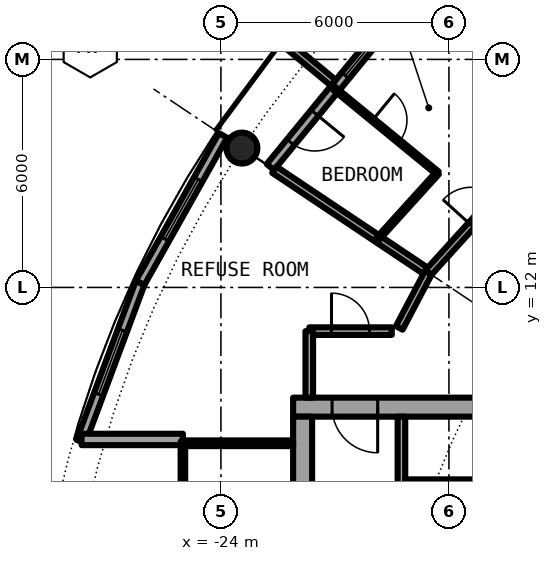
"""IFC4 building model, lengths in metres.
Left out: names, types, materials, properties, quantities, classifications, styles, units other than length and angle.
Written with IfcOpenShell. Run it as: python <this file> out.ifc"""

import sys

from ifc_helpers import new_model, si_unit, direction, frame, frame_2d, origin, origin_2d, place, context, subcontext, project, spatial, rectangle, hollow_circle, extrude, element, fill, save


model = new_model("IFC4")
c1 = context("Model", 3, precision=1e-05, world=origin(), true_north=direction((0.0, 1.0)))
c2 = subcontext(c1, "Body", "Model", "MODEL_VIEW")
j1 = project(units=[si_unit("LENGTHUNIT", "METRE"), si_unit("PLANEANGLEUNIT", "RADIAN")], contexts=[c1])
p1 = place(None, origin())
s1 = spatial("IfcSite", under=j1, at=p1, CompositionType="ELEMENT")
p2 = place(p1, origin())
s2 = spatial("IfcBuilding", under=s1, at=p2, CompositionType="ELEMENT")
p3 = place(p2, frame((0.0, 0.0, 145.2)))
s3 = spatial("IfcBuildingStorey", under=s2, at=p3, CompositionType="ELEMENT", Elevation=145.2)
p4 = place(p3, frame((-23.448, 15.667, 0.0), z_axis=(0.0, 0.0, 1.0), x_axis=(1.0, 0.0, 0.0)))
e1 = element("IfcColumn", 1, at=p4, inside=s3, PredefinedType="COLUMN", context=c2, shape_type="SweptSolid", body=[
    extrude(hollow_circle(Radius=0.406, WallThickness=0.04, at=origin_2d()), origin(), (0.0, 0.0, 1.0), 3.05),
])
p5 = place(p3, frame((-19.304, 19.304, 0.0), z_axis=(0.0, 0.0, 1.0), x_axis=(-0.634382322723, -0.773019449054, 0.0)))
e2 = element("IfcWall", 2, at=p5, inside=s3, PredefinedType="SOLIDWALL", context=c2, shape_type="SweptSolid", body=[
    extrude(rectangle(XDim=5.352, YDim=0.25, at=frame_2d((2.676, 0.0))), origin(), (0.0, 0.0, 1.0), 2.7),
])
p6 = place(p5, frame((0.441, 0.0, 0.3)))
e3 = element("IfcOpeningElement", 3, at=p6, cuts=e2, PredefinedType="OPENING", context=c2, shape_type="SweptSolid", body=[
    extrude(rectangle(XDim=1.8, YDim=2.1, at=frame_2d((0.9, 1.05))), frame((0.0, 0.135, 0.0), z_axis=(0.0, -1.0, 0.0), x_axis=(1.0, 0.0, 0.0)), (0.0, 0.0, 1.0), 0.27),
])
p7 = place(p5, frame((3.51, 0.0, 0.0)))
e4 = element("IfcOpeningElement", 4, at=p7, cuts=e2, PredefinedType="OPENING", context=c2, shape_type="SweptSolid", body=[
    extrude(rectangle(XDim=1.0, YDim=2.2, at=frame_2d((0.5, 1.1))), frame((0.0, 0.135, 0.0), z_axis=(0.0, -1.0, 0.0), x_axis=(1.0, 0.0, 0.0)), (0.0, 0.0, 1.0), 0.27),
])
p8 = place(p3, frame((-21.041, 17.384, -0.03), z_axis=(0.0, 0.0, 1.0), x_axis=(-0.770784861449, 0.63709551667, 0.0)))
e5 = element("IfcWall", 5, at=p8, inside=s3, PredefinedType="SOLIDWALL", context=c2, shape_type="SweptSolid", body=[
    extrude(rectangle(XDim=3.006, YDim=0.2, at=frame_2d((1.503, 0.0))), origin(), (0.0, 0.0, 1.0), 2.73),
])
p9 = place(p3, frame((-23.946, 16.0, 0.0), z_axis=(0.0, 0.0, 1.0), x_axis=(-0.489696356642, -0.871893042919, 0.0)))
e6 = element("IfcWall", 6, at=p9, inside=s3, PredefinedType="SOLIDWALL", context=c2, shape_type="SweptSolid", body=[
    extrude(rectangle(XDim=4.454, YDim=0.25, at=frame_2d((2.227, 0.0))), origin(), (0.0, 0.0, 1.0), 2.7),
])
p10 = place(p9, frame((1.327, 0.0, 0.3)))
e7 = element("IfcOpeningElement", 7, at=p10, cuts=e6, PredefinedType="OPENING", context=c2, shape_type="SweptSolid", body=[
    extrude(rectangle(XDim=1.8, YDim=2.1, at=frame_2d((0.9, 1.05))), frame((0.0, 0.135, 0.0), z_axis=(0.0, -1.0, 0.0), x_axis=(1.0, 0.0, 0.0)), (0.0, 0.0, 1.0), 0.27),
])
p11 = place(p3, frame((-26.127, 12.117, 0.0), z_axis=(0.0, 0.0, 1.0), x_axis=(-0.349247811493, -0.937030397675, 0.0)))
e8 = element("IfcWall", 8, at=p11, inside=s3, PredefinedType="SOLIDWALL", context=c2, shape_type="SweptSolid", body=[
    extrude(rectangle(XDim=4.452, YDim=0.25, at=frame_2d((2.226, 0.0))), origin(), (0.0, 0.0, 1.0), 2.7),
])
p12 = place(p11, frame((1.327, 0.0, 0.3)))
e9 = element("IfcOpeningElement", 9, at=p12, cuts=e8, PredefinedType="OPENING", context=c2, shape_type="SweptSolid", body=[
    extrude(rectangle(XDim=1.8, YDim=2.1, at=frame_2d((0.9, 1.05))), frame((0.0, 0.135, 0.0), z_axis=(0.0, -1.0, 0.0), x_axis=(1.0, 0.0, 0.0)), (0.0, 0.0, 1.0), 0.27),
])
p13 = place(p3, frame((-25.0, 8.0, 0.0), z_axis=(0.0, 0.0, 1.0), x_axis=(-1.0, 0.0, 0.0)))
e10 = element("IfcWall", 10, at=p13, inside=s3, PredefinedType="SOLIDWALL", context=c2, shape_type="SweptSolid", body=[
    extrude(rectangle(XDim=2.667, YDim=0.3, at=frame_2d((1.333, 0.0))), origin(), (0.0, 0.0, 1.0), 2.7),
])
p14 = place(p3, frame((-8.5, 8.85, 0.0), z_axis=(0.0, 0.0, 1.0), x_axis=(-1.0, 0.0, 0.0)))
e11 = element("IfcWall", 11, at=p14, inside=s3, PredefinedType="SHEAR", context=c2, shape_type="SweptSolid", body=[
    extrude(rectangle(XDim=13.6, YDim=0.5, at=frame_2d((6.8, 0.0))), origin(), (0.0, 0.0, 1.0), 3.05),
])
p15 = place(p14, frame((11.375, 0.0, 0.0)))
e12 = element("IfcOpeningElement", 12, at=p15, cuts=e11, PredefinedType="OPENING", context=c2, shape_type="SweptSolid", body=[
    extrude(rectangle(XDim=1.2, YDim=2.3, at=frame_2d((0.6, 1.15))), frame((0.0, 0.26, 0.0), z_axis=(0.0, -1.0, 0.0), x_axis=(1.0, 0.0, 0.0)), (0.0, 0.0, 1.0), 0.52),
])
p16 = place(p3, frame((-21.85, -8.6, 0.0), z_axis=(0.0, 0.0, 1.0), x_axis=(0.0, 1.0, 0.0)))
e13 = element("IfcWall", 13, at=p16, inside=s3, PredefinedType="SHEAR", context=c2, shape_type="SweptSolid", body=[
    extrude(rectangle(XDim=17.2, YDim=0.5, at=frame_2d((8.6, 0.0))), origin(), (0.0, 0.0, 1.0), 3.05),
])
p17 = place(p16, frame((7.7, 0.0, 0.0)))
e14 = element("IfcOpeningElement", 14, at=p17, cuts=e13, PredefinedType="OPENING", context=c2, shape_type="SweptSolid", body=[
    extrude(rectangle(XDim=1.8, YDim=2.3, at=frame_2d((0.9, 1.15))), frame((0.0, 0.26, 0.0), z_axis=(0.0, -1.0, 0.0), x_axis=(1.0, 0.0, 0.0)), (0.0, 0.0, 1.0), 0.52),
])
p18 = place(p3, frame((-19.25, 8.6, 0.0), z_axis=(0.0, 0.0, 1.0), x_axis=(0.0, -1.0, 0.0)))
e15 = element("IfcWall", 15, at=p18, inside=s3, PredefinedType="SOLIDWALL", context=c2, shape_type="SweptSolid", body=[
    extrude(rectangle(XDim=7.025, YDim=0.2, at=frame_2d((3.513, 0.0))), origin(), (0.0, 0.0, 1.0), 2.7),
])
p19 = place(p18, frame((2.35, 0.0, 0.0)))
e16 = element("IfcOpeningElement", 16, at=p19, cuts=e15, PredefinedType="OPENING", context=c2, shape_type="SweptSolid", body=[
    extrude(rectangle(XDim=1.1, YDim=2.3, at=frame_2d((0.55, 1.15))), frame((0.0, 0.11, 0.0), z_axis=(0.0, -1.0, 0.0), x_axis=(1.0, 0.0, 0.0)), (0.0, 0.0, 1.0), 0.22),
])
p20 = place(p3, frame((-15.45, 6.875, 0.0), z_axis=(0.0, 0.0, 1.0), x_axis=(-1.0, 0.0, 0.0)))
e17 = element("IfcWall", 17, at=p20, inside=s3, PredefinedType="PARTITIONING", context=c2, shape_type="SweptSolid", body=[
    extrude(rectangle(XDim=3.7, YDim=0.15, at=frame_2d((1.85, 0.0))), origin(), (0.0, 0.0, 1.0), 2.7),
])
p21 = place(p20, frame((1.4, 0.0, 0.0)))
e18 = element("IfcOpeningElement", 18, at=p21, cuts=e17, PredefinedType="OPENING", context=c2, shape_type="SweptSolid", body=[
    extrude(rectangle(XDim=0.9, YDim=2.3, at=frame_2d((0.45, 1.15))), frame((0.0, 0.085, 0.0), z_axis=(0.0, -1.0, 0.0), x_axis=(1.0, 0.0, 0.0)), (0.0, 0.0, 1.0), 0.17),
])
p22 = place(p3, frame((-22.1, 7.9, 0.0), z_axis=(0.0, 0.0, 1.0), x_axis=(-1.0, 0.0, 0.0)))
e19 = element("IfcWall", 19, at=p22, inside=s3, PredefinedType="PARTITIONING", context=c2, shape_type="SweptSolid", body=[
    extrude(rectangle(XDim=2.84, YDim=0.15, at=frame_2d((1.42, 0.0))), origin(), (0.0, 0.0, 1.0), 2.7),
])
p23 = place(p3, frame((-25.0, -7.95, 0.0), z_axis=(0.0, 0.0, 1.0), x_axis=(0.0, 1.0, 0.0)))
e20 = element("IfcWall", 20, at=p23, inside=s3, PredefinedType="PARTITIONING", context=c2, shape_type="SweptSolid", body=[
    extrude(rectangle(XDim=15.9, YDim=0.12, at=frame_2d((7.95, 0.0))), origin(), (0.0, 0.0, 1.0), 2.7),
])
p24 = place(p23, frame((6.75, 0.0, 0.0)))
e21 = element("IfcOpeningElement", 21, at=p24, cuts=e20, PredefinedType="OPENING", context=c2, shape_type="SweptSolid", body=[
    extrude(rectangle(XDim=2.4, YDim=2.3, at=frame_2d((1.2, 1.15))), frame((0.0, 0.07, 0.0), z_axis=(0.0, -1.0, 0.0), x_axis=(1.0, 0.0, 0.0)), (0.0, 0.0, 1.0), 0.14),
])
p25 = place(p23, frame((11.55, 0.0, 0.1)))
e22 = element("IfcOpeningElement", 22, at=p25, cuts=e20, PredefinedType="OPENING", context=c2, shape_type="SweptSolid", body=[
    extrude(rectangle(XDim=3.4, YDim=2.35, at=frame_2d((1.7, 1.175))), frame((0.0, 0.07, 0.0), z_axis=(0.0, -1.0, 0.0), x_axis=(1.0, 0.0, 0.0)), (0.0, 0.0, 1.0), 0.14),
])
p26 = place(p23, frame((0.95, 0.0, 0.1)))
e23 = element("IfcOpeningElement", 23, at=p26, cuts=e20, PredefinedType="OPENING", context=c2, shape_type="SweptSolid", body=[
    extrude(rectangle(XDim=3.4, YDim=2.35, at=frame_2d((1.7, 1.175))), frame((0.0, 0.07, 0.0), z_axis=(0.0, -1.0, 0.0), x_axis=(1.0, 0.0, 0.0)), (0.0, 0.0, 1.0), 0.14),
])
p27 = place(p3, frame((-22.595, 15.098, 0.0), z_axis=(0.0, 0.0, 1.0), x_axis=(0.831387096605, -0.55569370664, 0.0)))
e24 = element("IfcWall", 24, at=p27, inside=s3, PredefinedType="PARTITIONING", context=c2, shape_type="SweptSolid", body=[
    extrude(rectangle(XDim=4.875, YDim=0.2, at=frame_2d((2.438, 0.0))), origin(), (0.0, 0.0, 1.0), 2.7),
])
p28 = place(p3, frame((-21.012, 17.233, 0.0), z_axis=(0.0, 0.0, 1.0), x_axis=(0.773165322764, -0.634204528267, 0.0)))
e25 = element("IfcWall", 25, at=p28, inside=s3, PredefinedType="PARTITIONING", context=c2, shape_type="SweptSolid", body=[
    extrude(rectangle(XDim=3.505, YDim=0.1, at=frame_2d((1.752, 0.0))), origin(), (0.0, 0.0, 1.0), 2.7),
])
p29 = place(p28, frame((1.303, 0.0, 0.0)))
e26 = element("IfcOpeningElement", 26, at=p29, cuts=e25, PredefinedType="OPENING", context=c2, shape_type="SweptSolid", body=[
    extrude(rectangle(XDim=0.9, YDim=2.3, at=frame_2d((0.45, 1.15))), frame((0.0, 0.06, 0.0), z_axis=(0.0, -1.0, 0.0), x_axis=(1.0, 0.0, 0.0)), (0.0, 0.0, 1.0), 0.12),
])
p30 = place(p3, frame((-21.675, 10.85, 0.0), z_axis=(0.0, 0.0, 1.0), x_axis=(1.0, 0.0, 0.0)))
e27 = element("IfcWall", 27, at=p30, inside=s3, PredefinedType="PARTITIONING", context=c2, shape_type="SweptSolid", body=[
    extrude(rectangle(XDim=2.171, YDim=0.2, at=frame_2d((1.085, 0.0))), origin(), (0.0, 0.0, 1.0), 2.7),
])
p31 = place(p30, frame((0.585, 0.0, 0.0)))
e28 = element("IfcOpeningElement", 28, at=p31, cuts=e27, PredefinedType="OPENING", context=c2, shape_type="SweptSolid", body=[
    extrude(rectangle(XDim=1.0, YDim=2.3, at=frame_2d((0.5, 1.15))), frame((0.0, 0.11, 0.0), z_axis=(0.0, -1.0, 0.0), x_axis=(1.0, 0.0, 0.0)), (0.0, 0.0, 1.0), 0.22),
])
p32 = place(p3, frame((-21.675, 9.1, 0.0), z_axis=(0.0, 0.0, 1.0), x_axis=(0.0, 1.0, 0.0)))
e29 = element("IfcWall", 29, at=p32, inside=s3, PredefinedType="PARTITIONING", context=c2, shape_type="SweptSolid", body=[
    extrude(rectangle(XDim=1.75, YDim=0.2, at=frame_2d((0.875, 0.0))), origin(), (0.0, 0.0, 1.0), 2.7),
])
p33 = place(p3, frame((-18.542, 12.389, 0.0), z_axis=(0.0, 0.0, 1.0), x_axis=(0.671561669125, 0.740948665268, 0.0)))
e30 = element("IfcWall", 30, at=p33, inside=s3, PredefinedType="PARTITIONING", context=c2, shape_type="SweptSolid", body=[
    extrude(rectangle(XDim=6.544, YDim=0.2, at=frame_2d((3.272, 0.0))), origin(), (0.0, 0.0, 1.0), 2.7),
])
p34 = place(p33, frame((1.682, 0.0, 0.0)))
e31 = element("IfcOpeningElement", 31, at=p34, cuts=e30, PredefinedType="OPENING", context=c2, shape_type="SweptSolid", body=[
    extrude(rectangle(XDim=1.0, YDim=2.3, at=frame_2d((0.5, 1.15))), frame((0.0, 0.11, 0.0), z_axis=(0.0, -1.0, 0.0), x_axis=(1.0, 0.0, 0.0)), (0.0, 0.0, 1.0), 0.22),
])
p35 = place(p3, frame((-19.307, 10.935, 0.0), z_axis=(0.0, 0.0, 1.0), x_axis=(0.465605550524, 0.884992356646, 0.0)))
e32 = element("IfcWall", 32, at=p35, inside=s3, PredefinedType="PARTITIONING", context=c2, shape_type="SweptSolid", body=[
    extrude(rectangle(XDim=1.643, YDim=0.2, at=frame_2d((0.821, 0.0))), origin(), (0.0, 0.0, 1.0), 2.7),
])
p36 = place(p3, frame((-19.872, 13.278, 0.0), z_axis=(0.0, 0.0, 1.0), x_axis=(0.671637685376, 0.740879760544, 0.0)))
e33 = element("IfcWall", 33, at=p36, inside=s3, PredefinedType="PARTITIONING", context=c2, shape_type="SweptSolid", body=[
    extrude(rectangle(XDim=2.338, YDim=0.1, at=frame_2d((1.169, 0.0))), origin(), (0.0, 0.0, 1.0), 2.7),
])
p37 = place(p6, origin())
e34 = element("IfcWindow", 34, at=p37, inside=s3, PartitioningType="SINGLE_PANEL", PredefinedType="WINDOW", context=c2, shape_type="SweptSolid", body=[
    extrude(rectangle(XDim=1.8, YDim=2.1, at=frame_2d((0.9, 1.05))), frame((0.0, 0.03, 0.0), z_axis=(0.0, -1.0, 0.0), x_axis=(1.0, 0.0, 0.0)), (0.0, 0.0, 1.0), 0.06),
])
fill(e3, e34)
p38 = place(p7, origin())
e35 = element("IfcDoor", 35, at=p38, inside=s3, OperationType="SINGLE_SWING_LEFT", PredefinedType="DOOR", context=c2, shape_type="SweptSolid", body=[
    extrude(rectangle(XDim=1.0, YDim=2.2, at=frame_2d((0.5, 1.1))), frame((0.0, 0.025, 0.0), z_axis=(0.0, -1.0, 0.0), x_axis=(1.0, 0.0, 0.0)), (0.0, 0.0, 1.0), 0.05),
])
fill(e4, e35)
p39 = place(p10, origin())
e36 = element("IfcWindow", 36, at=p39, inside=s3, PartitioningType="SINGLE_PANEL", PredefinedType="WINDOW", context=c2, shape_type="SweptSolid", body=[
    extrude(rectangle(XDim=1.8, YDim=2.1, at=frame_2d((0.9, 1.05))), frame((0.0, 0.03, 0.0), z_axis=(0.0, -1.0, 0.0), x_axis=(1.0, 0.0, 0.0)), (0.0, 0.0, 1.0), 0.06),
])
fill(e7, e36)
p40 = place(p12, origin())
e37 = element("IfcWindow", 37, at=p40, inside=s3, PartitioningType="SINGLE_PANEL", PredefinedType="WINDOW", context=c2, shape_type="SweptSolid", body=[
    extrude(rectangle(XDim=1.8, YDim=2.1, at=frame_2d((0.9, 1.05))), frame((0.0, 0.03, 0.0), z_axis=(0.0, -1.0, 0.0), x_axis=(1.0, 0.0, 0.0)), (0.0, 0.0, 1.0), 0.06),
])
fill(e9, e37)
p41 = place(p21, origin())
e38 = element("IfcDoor", 38, at=p41, inside=s3, OperationType="SINGLE_SWING_LEFT", PredefinedType="DOOR", context=c2, shape_type="SweptSolid", body=[
    extrude(rectangle(XDim=0.9, YDim=2.3, at=frame_2d((0.45, 1.15))), frame((0.0, 0.025, 0.0), z_axis=(0.0, -1.0, 0.0), x_axis=(1.0, 0.0, 0.0)), (0.0, 0.0, 1.0), 0.05),
])
fill(e18, e38)
p42 = place(p15, origin())
e39 = element("IfcDoor", 39, at=p42, inside=s3, OperationType="SINGLE_SWING_LEFT", PredefinedType="DOOR", context=c2, shape_type="SweptSolid", body=[
    extrude(rectangle(XDim=1.2, YDim=2.3, at=frame_2d((0.6, 1.15))), frame((0.0, 0.025, 0.0), z_axis=(0.0, -1.0, 0.0), x_axis=(1.0, 0.0, 0.0)), (0.0, 0.0, 1.0), 0.05),
])
fill(e12, e39)
p43 = place(p25, origin())
e40 = element("IfcWindow", 40, at=p43, inside=s3, PartitioningType="SINGLE_PANEL", PredefinedType="WINDOW", context=c2, shape_type="SweptSolid", body=[
    extrude(rectangle(XDim=3.4, YDim=2.35, at=frame_2d((1.7, 1.175))), frame((0.0, 0.03, 0.0), z_axis=(0.0, -1.0, 0.0), x_axis=(1.0, 0.0, 0.0)), (0.0, 0.0, 1.0), 0.06),
])
fill(e22, e40)
p44 = place(p34, origin())
e41 = element("IfcDoor", 41, at=p44, inside=s3, OperationType="SINGLE_SWING_LEFT", PredefinedType="DOOR", context=c2, shape_type="SweptSolid", body=[
    extrude(rectangle(XDim=1.0, YDim=2.3, at=frame_2d((0.5, 1.15))), frame((0.0, 0.025, 0.0), z_axis=(0.0, -1.0, 0.0), x_axis=(1.0, 0.0, 0.0)), (0.0, 0.0, 1.0), 0.05),
])
fill(e31, e41)
p45 = place(p29, origin())
e42 = element("IfcDoor", 42, at=p45, inside=s3, OperationType="SINGLE_SWING_LEFT", PredefinedType="DOOR", context=c2, shape_type="SweptSolid", body=[
    extrude(rectangle(XDim=0.9, YDim=2.3, at=frame_2d((0.45, 1.15))), frame((0.0, 0.025, 0.0), z_axis=(0.0, -1.0, 0.0), x_axis=(1.0, 0.0, 0.0)), (0.0, 0.0, 1.0), 0.05),
])
fill(e26, e42)
p46 = place(p31, origin())
e43 = element("IfcDoor", 43, at=p46, inside=s3, OperationType="SINGLE_SWING_LEFT", PredefinedType="DOOR", context=c2, shape_type="SweptSolid", body=[
    extrude(rectangle(XDim=1.0, YDim=2.3, at=frame_2d((0.5, 1.15))), frame((0.0, 0.025, 0.0), z_axis=(0.0, -1.0, 0.0), x_axis=(1.0, 0.0, 0.0)), (0.0, 0.0, 1.0), 0.05),
])
fill(e28, e43)
save(model, sys.argv[1])
